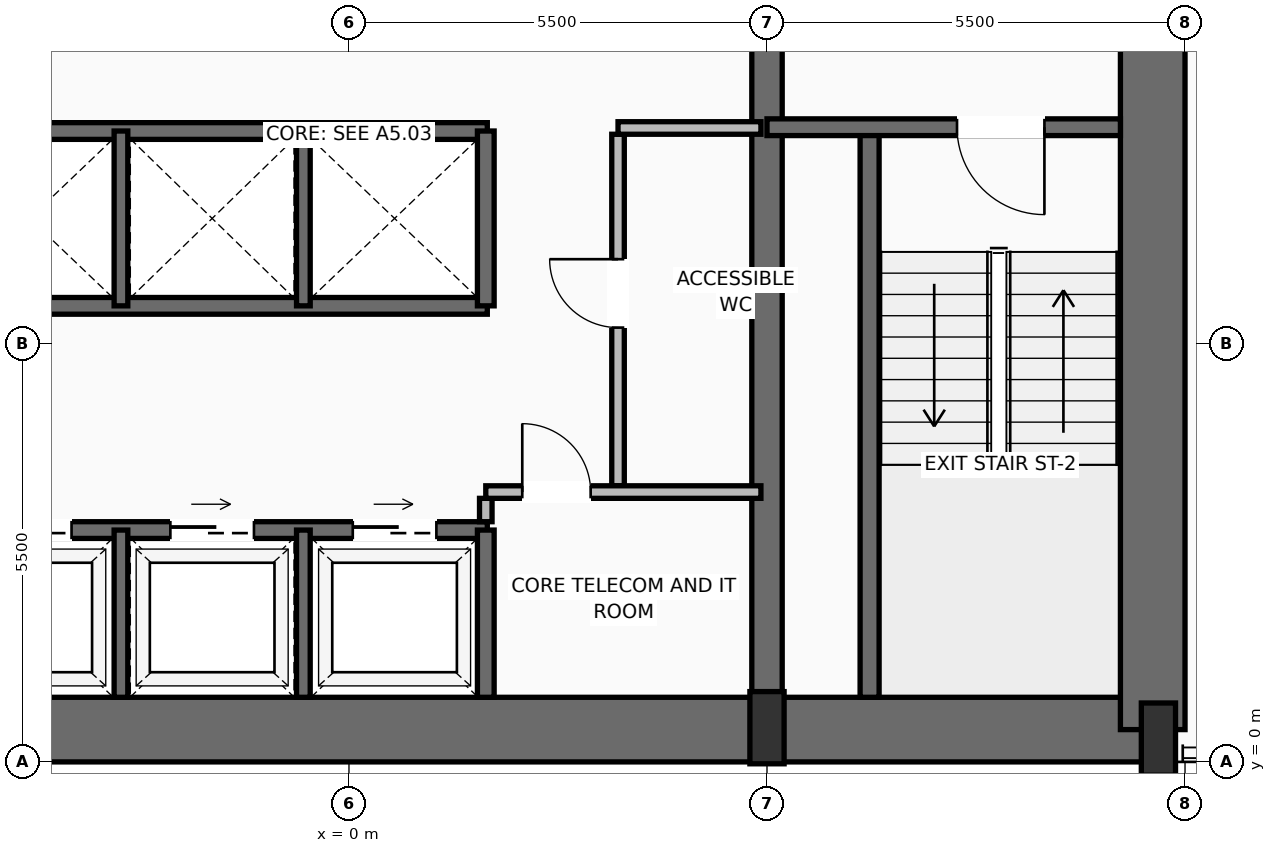
"""IFC4 building model, lengths in metres.
Left out: names, types, materials, properties, quantities, classifications, styles, units other than length and angle.
Written with IfcOpenShell. Run it as: python <this file> out.ifc"""

import sys

from ifc_helpers import new_model, si_unit, direction, frame, frame_2d, origin, origin_2d, place, context, subcontext, project, spatial, rectangle, extrude, source, transform, mapped, element, fill, save


model = new_model("IFC4")
c1 = context("Model", 3, precision=1e-05, world=origin(), true_north=direction((0.0, 1.0)))
c2 = subcontext(c1, "Body", "Model", "MODEL_VIEW")
j1 = project(units=[si_unit("LENGTHUNIT", "METRE"), si_unit("PLANEANGLEUNIT", "RADIAN")], contexts=[c1])
p1 = place(None, origin())
s1 = spatial("IfcSite", under=j1, at=p1, CompositionType="ELEMENT")
p2 = place(p1, origin())
s2 = spatial("IfcBuilding", under=s1, at=p2, CompositionType="ELEMENT")
p3 = place(p2, frame((0.0, 0.0, 46.0)))
s3 = spatial("IfcBuildingStorey", under=s2, at=p3, CompositionType="ELEMENT", Elevation=46.0)
p4 = place(p3, frame((-10.65, 0.425, 0.0), z_axis=(0.0, 0.0, 1.0), x_axis=(1.0, 0.0, 0.0)))
e1 = element("IfcWall", 1, at=p4, inside=s3, PredefinedType="SHEAR", context=c2, shape_type="SweptSolid", body=[
    extrude(rectangle(XDim=21.3, YDim=0.85, at=frame_2d((10.65, 0.0))), origin(), (0.0, 0.0, 1.0), 3.45),
])
p5 = place(p3, frame((10.575, 0.425, 0.0), z_axis=(0.0, 0.0, 1.0), x_axis=(0.0, 1.0, 0.0)))
e2 = element("IfcWall", 2, at=p5, inside=s3, PredefinedType="SHEAR", context=c2, shape_type="SweptSolid", body=[
    extrude(rectangle(XDim=15.75, YDim=0.85, at=frame_2d((7.875, 0.0))), origin(), (0.0, 0.0, 1.0), 3.45),
])
p6 = place(p3, frame((5.5, 0.425, 0.0), z_axis=(0.0, 0.0, 1.0), x_axis=(0.0, 1.0, 0.0)))
e3 = element("IfcWall", 3, at=p6, inside=s3, PredefinedType="SHEAR", context=c2, shape_type="SweptSolid", body=[
    extrude(rectangle(XDim=15.75, YDim=0.4, at=frame_2d((7.875, 0.0))), origin(), (0.0, 0.0, 1.0), 3.45),
])
p7 = place(p6, frame((9.075, 0.0, 0.0)))
e4 = element("IfcOpeningElement", 4, at=p7, cuts=e3, PredefinedType="OPENING", context=c2, shape_type="SweptSolid", body=[
    extrude(rectangle(XDim=1.1, YDim=2.2, at=frame_2d((0.55, 1.1))), frame((0.0, 0.21, 0.0), z_axis=(0.0, -1.0, 0.0), x_axis=(1.0, 0.0, 0.0)), (0.0, 0.0, 1.0), 0.42),
])
m1 = source(origin(), c2, "Body", "SweptSolid", [
    extrude(rectangle(XDim=0.45, YDim=0.95, at=origin_2d()), origin(), (0.0, 0.0, 1.0), 3.7),
])
for number, where, z_axis, x_axis in (
    (5, (5.5, 0.45, 0.0), (0.0, 0.0, 1.0), (1.0, 0.0, 0.0)),
    (6, (10.65, 0.3, 0.0), (0.0, 0.0, 1.0), (1.0, 0.0, 0.0)),
):
    element("IfcColumn", number, at=place(p3, frame(where, z_axis=z_axis, x_axis=x_axis)), inside=s3, PredefinedType="PILASTER", context=c2, shape_type="MappedRepresentation", body=[
        mapped(m1, transform((0.0, 0.0, 0.0), scale=1.0)),
    ])
p8 = place(p3, frame((6.85, 0.85, 0.0), z_axis=(0.0, 0.0, 1.0), x_axis=(0.0, 1.0, 0.0)))
e7 = element("IfcWall", 7, at=p8, inside=s3, PredefinedType="SOLIDWALL", context=c2, shape_type="SweptSolid", body=[
    extrude(rectangle(XDim=7.5, YDim=0.25, at=frame_2d((3.75, 0.0))), origin(), (0.0, 0.0, 1.0), 3.45),
])
p9 = place(p3, frame((10.15, 8.35, 0.0), z_axis=(0.0, 0.0, 1.0), x_axis=(-1.0, 0.0, 0.0)))
e8 = element("IfcWall", 8, at=p9, inside=s3, PredefinedType="SOLIDWALL", context=c2, shape_type="SweptSolid", body=[
    extrude(rectangle(XDim=4.65, YDim=0.22, at=frame_2d((2.325, 0.0))), origin(), (0.0, 0.0, 1.0), 3.45),
])
p10 = place(p9, frame((1.0, 0.0, 0.0)))
e9 = element("IfcOpeningElement", 9, at=p10, cuts=e8, PredefinedType="OPENING", context=c2, shape_type="SweptSolid", body=[
    extrude(rectangle(XDim=1.15, YDim=2.2, at=frame_2d((0.575, 1.1))), frame((0.0, 0.12, 0.0), z_axis=(0.0, -1.0, 0.0), x_axis=(1.0, 0.0, 0.0)), (0.0, 0.0, 1.0), 0.24),
])
p11 = place(p3, frame((-5.5, 3.05, 0.0), z_axis=(0.0, 0.0, 1.0), x_axis=(1.0, 0.0, 0.0)))
e10 = element("IfcWall", 10, at=p11, inside=s3, PredefinedType="SOLIDWALL", context=c2, shape_type="SweptSolid", body=[
    extrude(rectangle(XDim=7.32, YDim=0.22, at=frame_2d((3.66, 0.0))), origin(), (0.0, 0.0, 1.0), 3.45),
])
p12 = place(p11, frame((0.75, 0.0, 0.0)))
e11 = element("IfcOpeningElement", 11, at=p12, cuts=e10, PredefinedType="OPENING", context=c2, shape_type="SweptSolid", body=[
    extrude(rectangle(XDim=1.1, YDim=2.2, at=frame_2d((0.55, 1.1))), frame((0.0, 0.12, 0.0), z_axis=(0.0, -1.0, 0.0), x_axis=(1.0, 0.0, 0.0)), (0.0, 0.0, 1.0), 0.24),
])
p13 = place(p11, frame((3.15, 0.0, 0.0)))
e12 = element("IfcOpeningElement", 12, at=p13, cuts=e10, PredefinedType="OPENING", context=c2, shape_type="SweptSolid", body=[
    extrude(rectangle(XDim=1.1, YDim=2.2, at=frame_2d((0.55, 1.1))), frame((0.0, 0.12, 0.0), z_axis=(0.0, -1.0, 0.0), x_axis=(1.0, 0.0, 0.0)), (0.0, 0.0, 1.0), 0.24),
])
p14 = place(p11, frame((5.55, 0.0, 0.0)))
e13 = element("IfcOpeningElement", 13, at=p14, cuts=e10, PredefinedType="OPENING", context=c2, shape_type="SweptSolid", body=[
    extrude(rectangle(XDim=1.1, YDim=2.2, at=frame_2d((0.55, 1.1))), frame((0.0, 0.12, 0.0), z_axis=(0.0, -1.0, 0.0), x_axis=(1.0, 0.0, 0.0)), (0.0, 0.0, 1.0), 0.24),
])
p15 = place(p3, frame((1.8, 0.85, 0.0), z_axis=(0.0, 0.0, 1.0), x_axis=(0.0, 1.0, 0.0)))
e14 = element("IfcWall", 14, at=p15, inside=s3, PredefinedType="SOLIDWALL", context=c2, shape_type="SweptSolid", body=[
    extrude(rectangle(XDim=2.2, YDim=0.22, at=frame_2d((1.1, 0.0))), origin(), (0.0, 0.0, 1.0), 3.45),
])
for number, where, z_axis, x_axis in (
    (15, (-3.0, 0.85, 0.0), (0.0, 0.0, 1.0), (0.0, 1.0, 0.0)),
    (16, (-0.6, 0.85, 0.0), (0.0, 0.0, 1.0), (0.0, 1.0, 0.0)),
):
    element("IfcWall", number, at=place(p3, frame(where, z_axis=z_axis, x_axis=x_axis)), inside=s3, PredefinedType="SOLIDWALL", context=c2, shape_type="SweptSolid", body=[
        extrude(rectangle(XDim=2.2, YDim=0.18, at=frame_2d((1.1, 0.0))), origin(), (0.0, 0.0, 1.0), 3.45),
    ])
p16 = place(p3, frame((1.8, 3.16, 0.0), z_axis=(0.0, 0.0, 1.0), x_axis=(0.0, 1.0, 0.0)))
e17 = element("IfcWall", 17, at=p16, inside=s3, PredefinedType="PARTITIONING", context=c2, shape_type="SweptSolid", body=[
    extrude(rectangle(XDim=0.308, YDim=0.165, at=frame_2d((0.154, 0.0))), origin(), (0.0, 0.0, 1.0), 3.442),
])
p17 = place(p3, frame((3.54, 3.633, 0.0), z_axis=(0.0, 0.0, 1.0), x_axis=(0.0, 1.0, 0.0)))
e18 = element("IfcWall", 18, at=p17, inside=s3, PredefinedType="PARTITIONING", context=c2, shape_type="SweptSolid", body=[
    extrude(rectangle(XDim=4.625, YDim=0.165, at=frame_2d((2.312, 0.0))), origin(), (0.0, 0.0, 1.0), 3.442),
])
p18 = place(p17, frame((2.081, 0.0, 0.0)))
e19 = element("IfcOpeningElement", 19, at=p18, cuts=e18, PredefinedType="OPENING", context=c2, shape_type="SweptSolid", body=[
    extrude(rectangle(XDim=0.9, YDim=2.1, at=frame_2d((0.45, 1.05))), frame((0.0, 0.093, 0.0), z_axis=(0.0, -1.0, 0.0), x_axis=(1.0, 0.0, 0.0)), (0.0, 0.0, 1.0), 0.185),
])
p19 = place(p3, frame((3.54, 8.34, 0.0), z_axis=(0.0, 0.0, 1.0), x_axis=(1.0, 0.0, 0.0)))
e20 = element("IfcWall", 20, at=p19, inside=s3, PredefinedType="PARTITIONING", context=c2, shape_type="SweptSolid", body=[
    extrude(rectangle(XDim=1.88, YDim=0.165, at=frame_2d((0.94, 0.0))), origin(), (0.0, 0.0, 1.0), 3.442),
])
p20 = place(p3, frame((1.8, 3.55, 0.0), z_axis=(0.0, 0.0, 1.0), x_axis=(1.0, 0.0, 0.0)))
e21 = element("IfcWall", 21, at=p20, inside=s3, PredefinedType="PARTITIONING", context=c2, shape_type="SweptSolid", body=[
    extrude(rectangle(XDim=3.62, YDim=0.165, at=frame_2d((1.81, 0.0))), origin(), (0.0, 0.0, 1.0), 3.442),
])
p21 = place(p20, frame((0.48, 0.0, 0.0)))
e22 = element("IfcOpeningElement", 22, at=p21, cuts=e21, PredefinedType="OPENING", context=c2, shape_type="SweptSolid", body=[
    extrude(rectangle(XDim=0.9, YDim=2.1, at=frame_2d((0.45, 1.05))), frame((0.0, 0.093, 0.0), z_axis=(0.0, -1.0, 0.0), x_axis=(1.0, 0.0, 0.0)), (0.0, 0.0, 1.0), 0.185),
])
for number, where, z_axis, x_axis in (
    (23, (-5.5, 6.0, 0.0), (0.0, 0.0, 1.0), (1.0, 0.0, 0.0)),
    (24, (-5.5, 8.3, 0.0), (0.0, 0.0, 1.0), (1.0, 0.0, 0.0)),
):
    element("IfcWall", number, at=place(p3, frame(where, z_axis=z_axis, x_axis=x_axis)), inside=s3, PredefinedType="SOLIDWALL", context=c2, shape_type="SweptSolid", body=[
        extrude(rectangle(XDim=7.32, YDim=0.22, at=frame_2d((3.66, 0.0))), origin(), (0.0, 0.0, 1.0), 3.45),
    ])
p22 = place(p3, frame((1.8, 6.0, 0.0), z_axis=(0.0, 0.0, 1.0), x_axis=(0.0, 1.0, 0.0)))
e25 = element("IfcWall", 25, at=p22, inside=s3, PredefinedType="SOLIDWALL", context=c2, shape_type="SweptSolid", body=[
    extrude(rectangle(XDim=2.3, YDim=0.22, at=frame_2d((1.15, 0.0))), origin(), (0.0, 0.0, 1.0), 3.45),
])
for number, where, z_axis, x_axis in (
    (26, (-3.0, 6.0, 0.0), (0.0, 0.0, 1.0), (0.0, 1.0, 0.0)),
    (27, (-0.6, 6.0, 0.0), (0.0, 0.0, 1.0), (0.0, 1.0, 0.0)),
):
    element("IfcWall", number, at=place(p3, frame(where, z_axis=z_axis, x_axis=x_axis)), inside=s3, PredefinedType="SOLIDWALL", context=c2, shape_type="SweptSolid", body=[
        extrude(rectangle(XDim=2.3, YDim=0.18, at=frame_2d((1.15, 0.0))), origin(), (0.0, 0.0, 1.0), 3.45),
    ])
m2 = source(origin(), c2, "Body", "SweptSolid", [
    extrude(rectangle(XDim=1.15, YDim=2.2, at=frame_2d((0.575, 1.1))), frame((0.0, 0.025, 0.0), z_axis=(0.0, -1.0, 0.0), x_axis=(1.0, 0.0, 0.0)), (0.0, 0.0, 1.0), 0.05),
])
p23 = place(p10, origin())
e28 = element("IfcDoor", 28, at=p23, inside=s3, OperationType="SINGLE_SWING_LEFT", PredefinedType="DOOR", context=c2, shape_type="MappedRepresentation", body=[
    mapped(m2, transform((0.0, 0.0, 0.0), scale=1.0)),
])
fill(e9, e28)
m3 = source(origin(), c2, "Body", "SweptSolid", [
    extrude(rectangle(XDim=1.1, YDim=2.2, at=frame_2d((0.55, 1.1))), frame((0.0, 0.025, 0.0), z_axis=(0.0, -1.0, 0.0), x_axis=(1.0, 0.0, 0.0)), (0.0, 0.0, 1.0), 0.05),
])
p24 = place(p12, origin())
e29 = element("IfcDoor", 29, at=p24, inside=s3, OperationType="SLIDING_TO_RIGHT", PredefinedType="DOOR", context=c2, shape_type="MappedRepresentation", body=[
    mapped(m3, transform((0.0, 0.0, 0.0), scale=1.0)),
])
fill(e11, e29)
p25 = place(p13, origin())
e30 = element("IfcDoor", 30, at=p25, inside=s3, OperationType="SLIDING_TO_RIGHT", PredefinedType="DOOR", context=c2, shape_type="MappedRepresentation", body=[
    mapped(m3, transform((0.0, 0.0, 0.0), scale=1.0)),
])
fill(e12, e30)
p26 = place(p14, origin())
e31 = element("IfcDoor", 31, at=p26, inside=s3, OperationType="SLIDING_TO_RIGHT", PredefinedType="DOOR", context=c2, shape_type="MappedRepresentation", body=[
    mapped(m3, transform((0.0, 0.0, 0.0), scale=1.0)),
])
fill(e13, e31)
m4 = source(origin(), c2, "Body", "SweptSolid", [
    extrude(rectangle(XDim=0.9, YDim=2.1, at=frame_2d((0.45, 1.05))), frame((0.0, 0.025, 0.0), z_axis=(0.0, -1.0, 0.0), x_axis=(1.0, 0.0, 0.0)), (0.0, 0.0, 1.0), 0.05),
])
p27 = place(p21, origin())
e32 = element("IfcDoor", 32, at=p27, inside=s3, OperationType="SINGLE_SWING_LEFT", PredefinedType="DOOR", context=c2, shape_type="MappedRepresentation", body=[
    mapped(m4, transform((0.0, 0.0, 0.0), scale=1.0)),
])
fill(e22, e32)
p28 = place(p18, origin())
e33 = element("IfcDoor", 33, at=p28, inside=s3, OperationType="SINGLE_SWING_RIGHT", PredefinedType="DOOR", context=c2, shape_type="MappedRepresentation", body=[
    mapped(m4, transform((0.0, 0.0, 0.0), scale=1.0)),
])
fill(e19, e33)
save(model, sys.argv[1])
